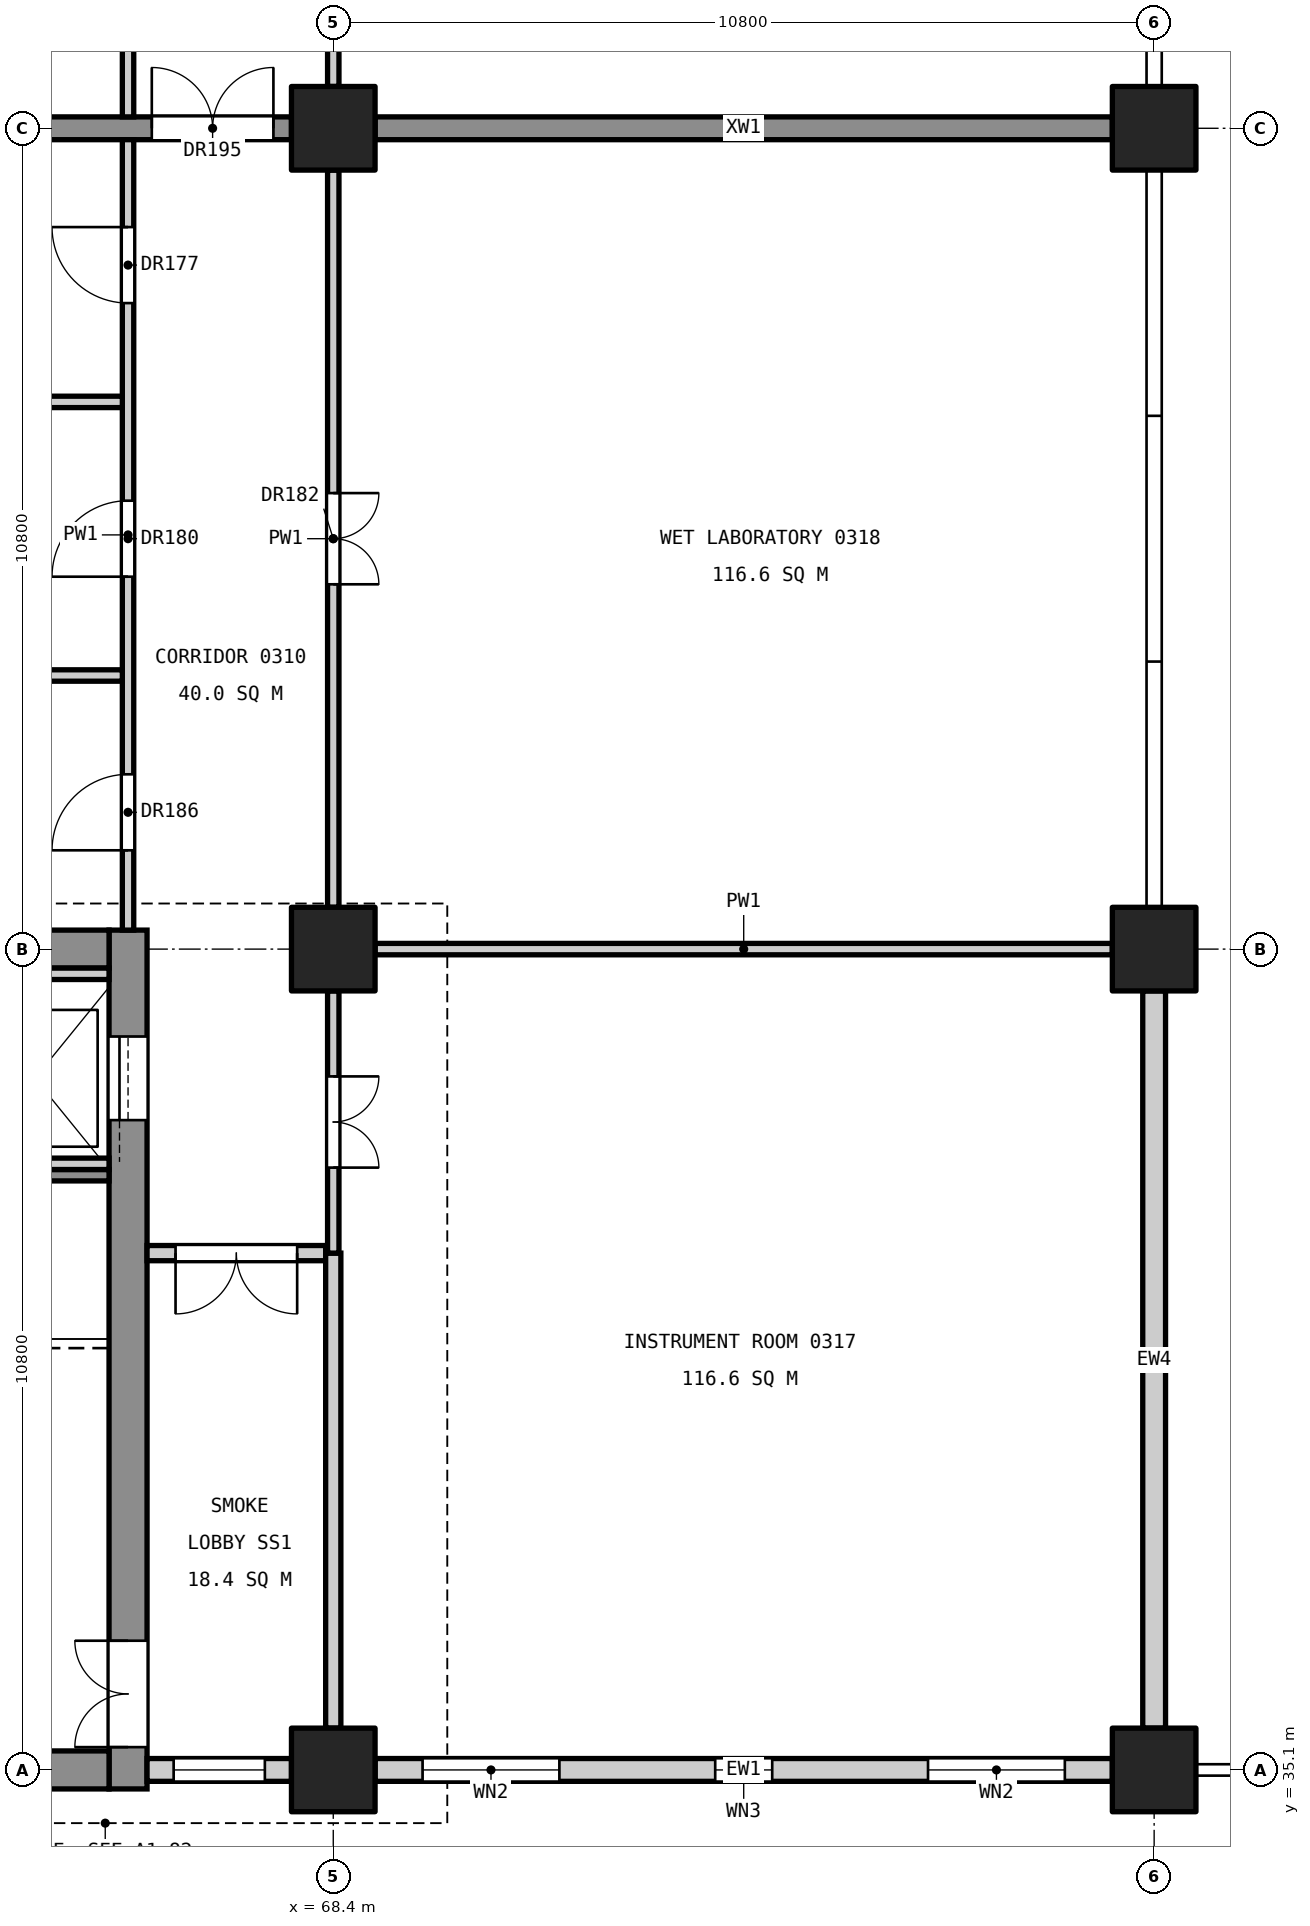
"""IFC4 building model, lengths in metres.
Left out: names, types, materials, properties, quantities, classifications, styles, units other than length and angle.
Written with IfcOpenShell. Run it as: python <this file> out.ifc"""

import sys

from ifc_helpers import new_model, si_unit, direction, frame, frame_2d, origin, origin_2d, place, context, subcontext, project, spatial, rectangle, extrude, element, fill, save


model = new_model("IFC4")
c1 = context("Model", 3, precision=1e-05, world=origin(), true_north=direction((0.0, 1.0)))
c2 = subcontext(c1, "Body", "Model", "MODEL_VIEW")
j1 = project(units=[si_unit("LENGTHUNIT", "METRE"), si_unit("PLANEANGLEUNIT", "RADIAN")], contexts=[c1])
p1 = place(None, origin())
s1 = spatial("IfcSite", under=j1, at=p1, CompositionType="ELEMENT")
p2 = place(p1, origin())
s2 = spatial("IfcBuilding", under=s1, at=p2, CompositionType="ELEMENT")
p3 = place(p2, frame((0.0, 0.0, 16.8)))
s3 = spatial("IfcBuildingStorey", under=s2, at=p3, CompositionType="ELEMENT", Elevation=16.8)
for number, where, z_axis, x_axis in (
    (1, (68.4, 35.1, 0.0), (0.0, 0.0, 1.0), (1.0, 0.0, 0.0)),
    (2, (68.4, 45.9, 0.0), (0.0, 0.0, 1.0), (1.0, 0.0, 0.0)),
    (3, (68.4, 56.7, 0.0), (0.0, 0.0, 1.0), (1.0, 0.0, 0.0)),
    (4, (79.2, 35.1, 0.0), (0.0, 0.0, 1.0), (1.0, 0.0, 0.0)),
    (5, (79.2, 45.9, 0.0), (0.0, 0.0, 1.0), (1.0, 0.0, 0.0)),
    (6, (79.2, 56.7, 0.0), (0.0, 0.0, 1.0), (1.0, 0.0, 0.0)),
):
    element("IfcColumn", number, at=place(p3, frame(where, z_axis=z_axis, x_axis=x_axis)), inside=s3, PredefinedType="COLUMN", context=c2, shape_type="SweptSolid", body=[
        extrude(rectangle(XDim=1.1, YDim=1.1, at=origin_2d()), origin(), (0.0, 0.0, 1.0), 5.4),
    ])
p4 = place(p3, frame((65.7, 34.85, 0.0), z_axis=(0.0, 0.0, 1.0), x_axis=(0.0, 1.0, 0.0)))
e7 = element("IfcWall", 7, at=p4, inside=s3, PredefinedType="SHEAR", context=c2, shape_type="SweptSolid", body=[
    extrude(rectangle(XDim=11.3, YDim=0.5, at=frame_2d((5.65, 0.0))), origin(), (0.0, 0.0, 1.0), 5.15),
])
p5 = place(p4, frame((0.55, 0.0, 0.0)))
e8 = element("IfcOpeningElement", 8, at=p5, cuts=e7, PredefinedType="OPENING", context=c2, shape_type="SweptSolid", body=[
    extrude(rectangle(XDim=1.4, YDim=2.1, at=frame_2d((0.7, 1.05))), frame((0.0, 0.26, 0.0), z_axis=(0.0, -1.0, 0.0), x_axis=(1.0, 0.0, 0.0)), (0.0, 0.0, 1.0), 0.52),
])
p6 = place(p4, frame((8.8, 0.0, 0.0)))
e9 = element("IfcOpeningElement", 9, at=p6, cuts=e7, PredefinedType="OPENING", context=c2, shape_type="SweptSolid", body=[
    extrude(rectangle(XDim=1.1, YDim=2.1, at=frame_2d((0.55, 1.05))), frame((0.0, 0.26, 0.0), z_axis=(0.0, -1.0, 0.0), x_axis=(1.0, 0.0, 0.0)), (0.0, 0.0, 1.0), 0.52),
])
p7 = place(p3, frame((61.45, 35.1, 0.0), z_axis=(0.0, 0.0, 1.0), x_axis=(1.0, 0.0, 0.0)))
e10 = element("IfcWall", 10, at=p7, inside=s3, PredefinedType="SHEAR", context=c2, shape_type="SweptSolid", body=[
    extrude(rectangle(XDim=4.0, YDim=0.5, at=frame_2d((2.0, 0.0))), origin(), (0.0, 0.0, 1.0), 5.15),
])
p8 = place(p7, frame((1.4, 0.0, 3.4)))
e11 = element("IfcOpeningElement", 11, at=p8, cuts=e10, PredefinedType="OPENING", context=c2, shape_type="SweptSolid", body=[
    extrude(rectangle(XDim=1.2, YDim=0.9, at=frame_2d((0.6, 0.45))), frame((0.0, 0.26, 0.0), z_axis=(0.0, -1.0, 0.0), x_axis=(1.0, 0.0, 0.0)), (0.0, 0.0, 1.0), 0.52),
])
p9 = place(p3, frame((61.45, 45.9, 0.0), z_axis=(0.0, 0.0, 1.0), x_axis=(1.0, 0.0, 0.0)))
e12 = element("IfcWall", 12, at=p9, inside=s3, PredefinedType="SHEAR", context=c2, shape_type="SweptSolid", body=[
    extrude(rectangle(XDim=4.0, YDim=0.5, at=frame_2d((2.0, 0.0))), origin(), (0.0, 0.0, 1.0), 5.15),
])
p10 = place(p3, frame((61.75, 56.7, 0.0), z_axis=(0.0, 0.0, 1.0), x_axis=(1.0, 0.0, 0.0)))
e13 = element("IfcWall", 13, at=p10, inside=s3, PredefinedType="SHEAR", context=c2, shape_type="SweptSolid", body=[
    extrude(rectangle(XDim=6.1, YDim=0.3, at=frame_2d((3.05, 0.0))), origin(), (0.0, 0.0, 1.0), 5.15),
])
p11 = place(p10, frame((4.262, 0.0, 0.0)))
e14 = element("IfcOpeningElement", 14, at=p11, cuts=e13, PredefinedType="OPENING", context=c2, shape_type="SweptSolid", body=[
    extrude(rectangle(XDim=1.6, YDim=2.1, at=frame_2d((0.8, 1.05))), frame((0.0, 0.16, 0.0), z_axis=(0.0, -1.0, 0.0), x_axis=(1.0, 0.0, 0.0)), (0.0, 0.0, 1.0), 0.32),
])
p12 = place(p3, frame((68.95, 56.7, 0.0), z_axis=(0.0, 0.0, 1.0), x_axis=(1.0, 0.0, 0.0)))
e15 = element("IfcWall", 15, at=p12, inside=s3, PredefinedType="SHEAR", context=c2, shape_type="SweptSolid", body=[
    extrude(rectangle(XDim=9.7, YDim=0.3, at=frame_2d((4.85, 0.0))), origin(), (0.0, 0.0, 1.0), 5.15),
])
p13 = place(p3, frame((61.45, 42.925, 0.0), z_axis=(0.0, 0.0, 1.0), x_axis=(1.0, 0.0, 0.0)))
e16 = element("IfcWall", 16, at=p13, inside=s3, PredefinedType="SOLIDWALL", context=c2, shape_type="SweptSolid", body=[
    extrude(rectangle(XDim=4.0, YDim=0.15, at=frame_2d((2.0, 0.0))), origin(), (0.0, 0.0, 1.0), 5.15),
])
for number, where, z_axis, x_axis in (
    (17, (63.65, 43.075, 0.0), (0.0, 0.0, 1.0), (1.0, 0.0, 0.0)),
    (18, (63.65, 45.575, 0.0), (0.0, 0.0, 1.0), (1.0, 0.0, 0.0)),
):
    element("IfcWall", number, at=place(p3, frame(where, z_axis=z_axis, x_axis=x_axis)), inside=s3, PredefinedType="SOLIDWALL", context=c2, shape_type="SweptSolid", body=[
        extrude(rectangle(XDim=1.8, YDim=0.15, at=frame_2d((0.9, 0.0))), origin(), (0.0, 0.0, 1.0), 5.4),
    ])
p14 = place(p3, frame((65.95, 35.1, 0.0), z_axis=(0.0, 0.0, 1.0), x_axis=(1.0, 0.0, 0.0)))
e19 = element("IfcWall", 19, at=p14, inside=s3, PredefinedType="STANDARD", context=c2, shape_type="SweptSolid", body=[
    extrude(rectangle(XDim=1.9, YDim=0.3, at=frame_2d((0.95, 0.0))), origin(), (0.0, 0.0, 1.0), 4.45),
])
p15 = place(p14, frame((0.35, 0.0, 0.9)))
e20 = element("IfcOpeningElement", 20, at=p15, cuts=e19, PredefinedType="OPENING", context=c2, shape_type="SweptSolid", body=[
    extrude(rectangle(XDim=1.2, YDim=2.4, at=frame_2d((0.6, 1.2))), frame((0.0, 0.16, 0.0), z_axis=(0.0, -1.0, 0.0), x_axis=(1.0, 0.0, 0.0)), (0.0, 0.0, 1.0), 0.32),
])
p16 = place(p3, frame((68.95, 35.1, 0.0), z_axis=(0.0, 0.0, 1.0), x_axis=(1.0, 0.0, 0.0)))
e21 = element("IfcWall", 21, at=p16, inside=s3, PredefinedType="STANDARD", context=c2, shape_type="SweptSolid", body=[
    extrude(rectangle(XDim=9.7, YDim=0.3, at=frame_2d((4.85, 0.0))), origin(), (0.0, 0.0, 1.0), 4.45),
])
p17 = place(p16, frame((0.625, 0.0, 0.9)))
e22 = element("IfcOpeningElement", 22, at=p17, cuts=e21, PredefinedType="OPENING", context=c2, shape_type="SweptSolid", body=[
    extrude(rectangle(XDim=1.8, YDim=3.0, at=frame_2d((0.9, 1.5))), frame((0.0, 0.16, 0.0), z_axis=(0.0, -1.0, 0.0), x_axis=(1.0, 0.0, 0.0)), (0.0, 0.0, 1.0), 0.32),
])
p18 = place(p16, frame((4.475, 0.0, 0.8)))
e23 = element("IfcOpeningElement", 23, at=p18, cuts=e21, PredefinedType="OPENING", context=c2, shape_type="SweptSolid", body=[
    extrude(rectangle(XDim=0.75, YDim=1.2, at=frame_2d((0.375, 0.6))), frame((0.0, 0.16, 0.0), z_axis=(0.0, -1.0, 0.0), x_axis=(1.0, 0.0, 0.0)), (0.0, 0.0, 1.0), 0.32),
])
p19 = place(p16, frame((7.275, 0.0, 0.9)))
e24 = element("IfcOpeningElement", 24, at=p19, cuts=e21, PredefinedType="OPENING", context=c2, shape_type="SweptSolid", body=[
    extrude(rectangle(XDim=1.8, YDim=3.0, at=frame_2d((0.9, 1.5))), frame((0.0, 0.16, 0.0), z_axis=(0.0, -1.0, 0.0), x_axis=(1.0, 0.0, 0.0)), (0.0, 0.0, 1.0), 0.32),
])
p20 = place(p3, frame((79.2, 35.65, 0.0), z_axis=(0.0, 0.0, 1.0), x_axis=(0.0, 1.0, 0.0)))
e25 = element("IfcWall", 25, at=p20, inside=s3, PredefinedType="STANDARD", context=c2, shape_type="SweptSolid", body=[
    extrude(rectangle(XDim=9.7, YDim=0.3, at=frame_2d((4.85, 0.0))), origin(), (0.0, 0.0, 1.0), 4.15),
])
p21 = place(p3, frame((65.7, 46.15, 0.0), z_axis=(0.0, 0.0, 1.0), x_axis=(0.0, 1.0, 0.0)))
e26 = element("IfcWall", 26, at=p21, inside=s3, PredefinedType="PARTITIONING", context=c2, shape_type="SweptSolid", body=[
    extrude(rectangle(XDim=10.4, YDim=0.15, at=frame_2d((5.2, 0.0))), origin(), (0.0, 0.0, 1.0), 4.05),
])
p22 = place(p21, frame((8.25, 0.0, 0.0)))
e27 = element("IfcOpeningElement", 27, at=p22, cuts=e26, PredefinedType="OPENING", context=c2, shape_type="SweptSolid", body=[
    extrude(rectangle(XDim=1.0, YDim=2.1, at=frame_2d((0.5, 1.05))), frame((0.0, 0.085, 0.0), z_axis=(0.0, -1.0, 0.0), x_axis=(1.0, 0.0, 0.0)), (0.0, 0.0, 1.0), 0.17),
])
p23 = place(p21, frame((4.65, 0.0, 0.0)))
e28 = element("IfcOpeningElement", 28, at=p23, cuts=e26, PredefinedType="OPENING", context=c2, shape_type="SweptSolid", body=[
    extrude(rectangle(XDim=1.0, YDim=2.1, at=frame_2d((0.5, 1.05))), frame((0.0, 0.085, 0.0), z_axis=(0.0, -1.0, 0.0), x_axis=(1.0, 0.0, 0.0)), (0.0, 0.0, 1.0), 0.17),
])
p24 = place(p21, frame((1.05, 0.0, 0.0)))
e29 = element("IfcOpeningElement", 29, at=p24, cuts=e26, PredefinedType="OPENING", context=c2, shape_type="SweptSolid", body=[
    extrude(rectangle(XDim=1.0, YDim=2.1, at=frame_2d((0.5, 1.05))), frame((0.0, 0.085, 0.0), z_axis=(0.0, -1.0, 0.0), x_axis=(1.0, 0.0, 0.0)), (0.0, 0.0, 1.0), 0.17),
])
p25 = place(p3, frame((65.7, 56.85, 0.0), z_axis=(0.0, 0.0, 1.0), x_axis=(0.0, 1.0, 0.0)))
e30 = element("IfcWall", 30, at=p25, inside=s3, PredefinedType="PARTITIONING", context=c2, shape_type="SweptSolid", body=[
    extrude(rectangle(XDim=3.2, YDim=0.15, at=frame_2d((1.6, 0.0))), origin(), (0.0, 0.0, 1.0), 4.05),
])
p26 = place(p25, frame((1.15, 0.0, 0.0)))
e31 = element("IfcOpeningElement", 31, at=p26, cuts=e30, PredefinedType="OPENING", context=c2, shape_type="SweptSolid", body=[
    extrude(rectangle(XDim=1.0, YDim=2.1, at=frame_2d((0.5, 1.05))), frame((0.0, 0.085, 0.0), z_axis=(0.0, -1.0, 0.0), x_axis=(1.0, 0.0, 0.0)), (0.0, 0.0, 1.0), 0.17),
])
for number, where, z_axis, x_axis in (
    (32, (61.35, 49.5, 0.0), (0.0, 0.0, 1.0), (1.0, 0.0, 0.0)),
    (33, (61.35, 53.1, 0.0), (0.0, 0.0, 1.0), (1.0, 0.0, 0.0)),
):
    element("IfcWall", number, at=place(p3, frame(where, z_axis=z_axis, x_axis=x_axis)), inside=s3, PredefinedType="PARTITIONING", context=c2, shape_type="SweptSolid", body=[
        extrude(rectangle(XDim=4.275, YDim=0.15, at=frame_2d((2.137, 0.0))), origin(), (0.0, 0.0, 1.0), 4.05),
    ])
p27 = place(p3, frame((65.95, 41.9, 0.0), z_axis=(0.0, 0.0, 1.0), x_axis=(1.0, 0.0, 0.0)))
e34 = element("IfcWall", 34, at=p27, inside=s3, PredefinedType="PARTITIONING", context=c2, shape_type="SweptSolid", body=[
    extrude(rectangle(XDim=2.35, YDim=0.2, at=frame_2d((1.175, 0.0))), origin(), (0.0, 0.0, 1.0), 4.05),
])
p28 = place(p27, frame((0.375, 0.0, 0.0)))
e35 = element("IfcOpeningElement", 35, at=p28, cuts=e34, PredefinedType="OPENING", context=c2, shape_type="SweptSolid", body=[
    extrude(rectangle(XDim=1.6, YDim=2.1, at=frame_2d((0.8, 1.05))), frame((0.0, 0.11, 0.0), z_axis=(0.0, -1.0, 0.0), x_axis=(1.0, 0.0, 0.0)), (0.0, 0.0, 1.0), 0.22),
])
p29 = place(p3, frame((68.4, 35.65, 0.0), z_axis=(0.0, 0.0, 1.0), x_axis=(0.0, 1.0, 0.0)))
e36 = element("IfcWall", 36, at=p29, inside=s3, PredefinedType="PARTITIONING", context=c2, shape_type="SweptSolid", body=[
    extrude(rectangle(XDim=6.25, YDim=0.2, at=frame_2d((3.125, 0.0))), origin(), (0.0, 0.0, 1.0), 4.15),
])
p30 = place(p3, frame((68.4, 41.9, 0.0), z_axis=(0.0, 0.0, 1.0), x_axis=(0.0, 1.0, 0.0)))
e37 = element("IfcWall", 37, at=p30, inside=s3, PredefinedType="PARTITIONING", context=c2, shape_type="SweptSolid", body=[
    extrude(rectangle(XDim=3.45, YDim=0.15, at=frame_2d((1.725, 0.0))), origin(), (0.0, 0.0, 1.0), 4.15),
])
p31 = place(p30, frame((1.125, 0.0, 0.0)))
e38 = element("IfcOpeningElement", 38, at=p31, cuts=e37, PredefinedType="OPENING", context=c2, shape_type="SweptSolid", body=[
    extrude(rectangle(XDim=1.2, YDim=2.1, at=frame_2d((0.6, 1.05))), frame((0.0, 0.085, 0.0), z_axis=(0.0, -1.0, 0.0), x_axis=(1.0, 0.0, 0.0)), (0.0, 0.0, 1.0), 0.17),
])
p32 = place(p3, frame((68.4, 46.45, 0.0), z_axis=(0.0, 0.0, 1.0), x_axis=(0.0, 1.0, 0.0)))
e39 = element("IfcWall", 39, at=p32, inside=s3, PredefinedType="PARTITIONING", context=c2, shape_type="SweptSolid", body=[
    extrude(rectangle(XDim=9.7, YDim=0.15, at=frame_2d((4.85, 0.0))), origin(), (0.0, 0.0, 1.0), 4.15),
])
p33 = place(p32, frame((4.25, 0.0, 0.0)))
e40 = element("IfcOpeningElement", 40, at=p33, cuts=e39, PredefinedType="OPENING", context=c2, shape_type="SweptSolid", body=[
    extrude(rectangle(XDim=1.2, YDim=2.1, at=frame_2d((0.6, 1.05))), frame((0.0, 0.085, 0.0), z_axis=(0.0, -1.0, 0.0), x_axis=(1.0, 0.0, 0.0)), (0.0, 0.0, 1.0), 0.17),
])
p34 = place(p3, frame((68.4, 57.25, 0.0), z_axis=(0.0, 0.0, 1.0), x_axis=(0.0, 1.0, 0.0)))
e41 = element("IfcWall", 41, at=p34, inside=s3, PredefinedType="PARTITIONING", context=c2, shape_type="SweptSolid", body=[
    extrude(rectangle(XDim=3.05, YDim=0.15, at=frame_2d((1.525, 0.0))), origin(), (0.0, 0.0, 1.0), 4.15),
])
p35 = place(p3, frame((68.95, 45.9, 0.0), z_axis=(0.0, 0.0, 1.0), x_axis=(1.0, 0.0, 0.0)))
e42 = element("IfcWall", 42, at=p35, inside=s3, PredefinedType="PARTITIONING", context=c2, shape_type="SweptSolid", body=[
    extrude(rectangle(XDim=9.7, YDim=0.15, at=frame_2d((4.85, 0.0))), origin(), (0.0, 0.0, 1.0), 4.05),
])
p36 = place(p5, origin())
e43 = element("IfcDoor", 43, at=p36, inside=s3, OperationType="DOUBLE_DOOR_SINGLE_SWING", PredefinedType="DOOR", context=c2, shape_type="SweptSolid", body=[
    extrude(rectangle(XDim=1.4, YDim=2.1, at=frame_2d((0.7, 1.05))), frame((0.0, 0.025, 0.0), z_axis=(0.0, -1.0, 0.0), x_axis=(1.0, 0.0, 0.0)), (0.0, 0.0, 1.0), 0.05),
])
fill(e8, e43)
p37 = place(p6, origin())
e44 = element("IfcDoor", 44, at=p37, inside=s3, OperationType="SLIDING_TO_LEFT", PredefinedType="DOOR", context=c2, shape_type="SweptSolid", body=[
    extrude(rectangle(XDim=1.1, YDim=2.1, at=frame_2d((0.55, 1.05))), frame((0.0, 0.025, 0.0), z_axis=(0.0, -1.0, 0.0), x_axis=(1.0, 0.0, 0.0)), (0.0, 0.0, 1.0), 0.05),
])
fill(e9, e44)
p38 = place(p15, origin())
e45 = element("IfcWindow", 45, at=p38, inside=s3, PartitioningType="SINGLE_PANEL", PredefinedType="WINDOW", context=c2, shape_type="SweptSolid", body=[
    extrude(rectangle(XDim=1.2, YDim=2.4, at=frame_2d((0.6, 1.2))), frame((0.0, 0.03, 0.0), z_axis=(0.0, -1.0, 0.0), x_axis=(1.0, 0.0, 0.0)), (0.0, 0.0, 1.0), 0.06),
])
fill(e20, e45)
p39 = place(p17, origin())
e46 = element("IfcWindow", 46, at=p39, inside=s3, PartitioningType="SINGLE_PANEL", PredefinedType="WINDOW", context=c2, shape_type="SweptSolid", body=[
    extrude(rectangle(XDim=1.8, YDim=3.0, at=frame_2d((0.9, 1.5))), frame((0.0, 0.03, 0.0), z_axis=(0.0, -1.0, 0.0), x_axis=(1.0, 0.0, 0.0)), (0.0, 0.0, 1.0), 0.06),
])
fill(e22, e46)
p40 = place(p18, origin())
e47 = element("IfcWindow", 47, at=p40, inside=s3, PartitioningType="SINGLE_PANEL", PredefinedType="WINDOW", context=c2, shape_type="SweptSolid", body=[
    extrude(rectangle(XDim=0.75, YDim=1.2, at=frame_2d((0.375, 0.6))), frame((0.0, 0.03, 0.0), z_axis=(0.0, -1.0, 0.0), x_axis=(1.0, 0.0, 0.0)), (0.0, 0.0, 1.0), 0.06),
])
fill(e23, e47)
p41 = place(p19, origin())
e48 = element("IfcWindow", 48, at=p41, inside=s3, PartitioningType="SINGLE_PANEL", PredefinedType="WINDOW", context=c2, shape_type="SweptSolid", body=[
    extrude(rectangle(XDim=1.8, YDim=3.0, at=frame_2d((0.9, 1.5))), frame((0.0, 0.03, 0.0), z_axis=(0.0, -1.0, 0.0), x_axis=(1.0, 0.0, 0.0)), (0.0, 0.0, 1.0), 0.06),
])
fill(e24, e48)
p42 = place(p22, origin())
e49 = element("IfcDoor", 49, at=p42, inside=s3, OperationType="SINGLE_SWING_RIGHT", PredefinedType="DOOR", context=c2, shape_type="SweptSolid", body=[
    extrude(rectangle(XDim=1.0, YDim=2.1, at=frame_2d((0.5, 1.05))), frame((0.0, 0.025, 0.0), z_axis=(0.0, -1.0, 0.0), x_axis=(1.0, 0.0, 0.0)), (0.0, 0.0, 1.0), 0.05),
])
fill(e27, e49)
p43 = place(p31, frame((1.2, 0.0, 0.0), z_axis=(0.0, 0.0, 1.0), x_axis=(-1.0, 0.0, 0.0)))
e50 = element("IfcDoor", 50, at=p43, inside=s3, OperationType="DOUBLE_DOOR_SINGLE_SWING", PredefinedType="DOOR", context=c2, shape_type="SweptSolid", body=[
    extrude(rectangle(XDim=1.2, YDim=2.1, at=frame_2d((0.6, 1.05))), frame((0.0, 0.025, 0.0), z_axis=(0.0, -1.0, 0.0), x_axis=(1.0, 0.0, 0.0)), (0.0, 0.0, 1.0), 0.05),
])
fill(e38, e50)
p44 = place(p23, origin())
e51 = element("IfcDoor", 51, at=p44, inside=s3, OperationType="SINGLE_SWING_LEFT", PredefinedType="DOOR", context=c2, shape_type="SweptSolid", body=[
    extrude(rectangle(XDim=1.0, YDim=2.1, at=frame_2d((0.5, 1.05))), frame((0.0, 0.025, 0.0), z_axis=(0.0, -1.0, 0.0), x_axis=(1.0, 0.0, 0.0)), (0.0, 0.0, 1.0), 0.05),
])
fill(e28, e51)
p45 = place(p33, frame((1.2, 0.0, 0.0), z_axis=(0.0, 0.0, 1.0), x_axis=(-1.0, 0.0, 0.0)))
e52 = element("IfcDoor", 52, at=p45, inside=s3, OperationType="DOUBLE_DOOR_SINGLE_SWING", PredefinedType="DOOR", context=c2, shape_type="SweptSolid", body=[
    extrude(rectangle(XDim=1.2, YDim=2.1, at=frame_2d((0.6, 1.05))), frame((0.0, 0.025, 0.0), z_axis=(0.0, -1.0, 0.0), x_axis=(1.0, 0.0, 0.0)), (0.0, 0.0, 1.0), 0.05),
])
fill(e40, e52)
p46 = place(p24, origin())
e53 = element("IfcDoor", 53, at=p46, inside=s3, OperationType="SINGLE_SWING_LEFT", PredefinedType="DOOR", context=c2, shape_type="SweptSolid", body=[
    extrude(rectangle(XDim=1.0, YDim=2.1, at=frame_2d((0.5, 1.05))), frame((0.0, 0.025, 0.0), z_axis=(0.0, -1.0, 0.0), x_axis=(1.0, 0.0, 0.0)), (0.0, 0.0, 1.0), 0.05),
])
fill(e29, e53)
p47 = place(p28, frame((1.6, 0.0, 0.0), z_axis=(0.0, 0.0, 1.0), x_axis=(-1.0, 0.0, 0.0)))
e54 = element("IfcDoor", 54, at=p47, inside=s3, OperationType="DOUBLE_DOOR_SINGLE_SWING", PredefinedType="DOOR", context=c2, shape_type="SweptSolid", body=[
    extrude(rectangle(XDim=1.6, YDim=2.1, at=frame_2d((0.8, 1.05))), frame((0.0, 0.025, 0.0), z_axis=(0.0, -1.0, 0.0), x_axis=(1.0, 0.0, 0.0)), (0.0, 0.0, 1.0), 0.05),
])
fill(e35, e54)
p48 = place(p11, origin())
e55 = element("IfcDoor", 55, at=p48, inside=s3, OperationType="DOUBLE_DOOR_SINGLE_SWING", PredefinedType="DOOR", context=c2, shape_type="SweptSolid", body=[
    extrude(rectangle(XDim=1.6, YDim=2.1, at=frame_2d((0.8, 1.05))), frame((0.0, 0.025, 0.0), z_axis=(0.0, -1.0, 0.0), x_axis=(1.0, 0.0, 0.0)), (0.0, 0.0, 1.0), 0.05),
])
fill(e14, e55)
save(model, sys.argv[1])
